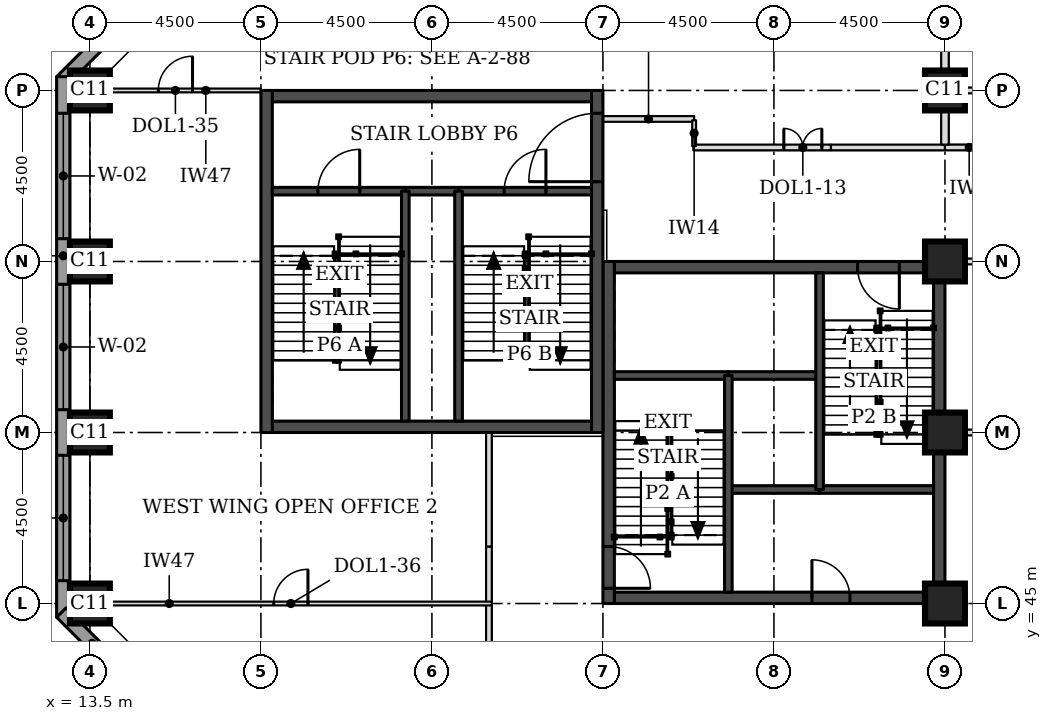
"""IFC4 building model, lengths in metres.
Left out: names, types, materials, properties, quantities, classifications, styles, units other than length and angle.
Written with IfcOpenShell. Run it as: python <this file> out.ifc"""

import sys

from ifc_helpers import new_model, si_unit, direction, frame, frame_2d, origin, origin_2d, place, context, subcontext, project, spatial, rectangle, extrude, element, fill, save


model = new_model("IFC4")
c1 = context("Model", 3, precision=1e-05, world=origin(), true_north=direction((0.0, 1.0)))
c2 = subcontext(c1, "Body", "Model", "MODEL_VIEW")
j1 = project(units=[si_unit("LENGTHUNIT", "METRE"), si_unit("PLANEANGLEUNIT", "RADIAN")], contexts=[c1])
p1 = place(None, origin())
s1 = spatial("IfcSite", under=j1, at=p1, CompositionType="ELEMENT")
p2 = place(p1, origin())
s2 = spatial("IfcBuilding", under=s1, at=p2, CompositionType="ELEMENT")
p3 = place(p2, frame((0.0, 0.0, 78.9)))
s3 = spatial("IfcBuildingStorey", under=s2, at=p3, CompositionType="ELEMENT", Elevation=78.9)
for number, where, z_axis, x_axis in (
    (1, (13.5, 45.0, 0.0), (0.0, 0.0, 1.0), (1.0, 0.0, 0.0)),
    (2, (36.0, 45.0, 0.0), (0.0, 0.0, 1.0), (1.0, 0.0, 0.0)),
    (3, (13.5, 49.5, 0.0), (0.0, 0.0, 1.0), (1.0, 0.0, 0.0)),
    (4, (36.0, 49.5, 0.0), (0.0, 0.0, 1.0), (1.0, 0.0, 0.0)),
    (5, (13.5, 54.0, 0.0), (0.0, 0.0, 1.0), (1.0, 0.0, 0.0)),
    (6, (36.0, 54.0, 0.0), (0.0, 0.0, 1.0), (1.0, 0.0, 0.0)),
    (7, (13.5, 58.5, 0.0), (0.0, 0.0, 1.0), (1.0, 0.0, 0.0)),
    (8, (36.0, 58.5, 0.0), (0.0, 0.0, 1.0), (1.0, 0.0, 0.0)),
):
    element("IfcColumn", number, at=place(p3, frame(where, z_axis=z_axis, x_axis=x_axis)), inside=s3, PredefinedType="COLUMN", context=c2, shape_type="SweptSolid", body=[
        extrude(rectangle(XDim=1.05, YDim=1.05, at=origin_2d()), origin(), (0.0, 0.0, 1.0), 3.7),
    ])
p4 = place(p3, frame((27.3, 45.15, 0.0), z_axis=(0.0, 0.0, 1.0), x_axis=(1.0, 0.0, 0.0)))
e9 = element("IfcWall", 9, at=p4, inside=s3, PredefinedType="SHEAR", context=c2, shape_type="SweptSolid", body=[
    extrude(rectangle(XDim=8.4, YDim=0.3, at=frame_2d((4.2, 0.0))), origin(), (0.0, 0.0, 1.0), 3.7),
])
p5 = place(p4, frame((5.2, 0.0, 0.0)))
e10 = element("IfcOpeningElement", 10, at=p5, cuts=e9, PredefinedType="OPENING", context=c2, shape_type="SweptSolid", body=[
    extrude(rectangle(XDim=1.0, YDim=2.1, at=frame_2d((0.5, 1.05))), frame((0.0, 0.16, 0.0), z_axis=(0.0, -1.0, 0.0), x_axis=(1.0, 0.0, 0.0)), (0.0, 0.0, 1.0), 0.32),
])
p6 = place(p3, frame((27.3, 53.85, 0.0), z_axis=(0.0, 0.0, 1.0), x_axis=(1.0, 0.0, 0.0)))
e11 = element("IfcWall", 11, at=p6, inside=s3, PredefinedType="SHEAR", context=c2, shape_type="SweptSolid", body=[
    extrude(rectangle(XDim=8.4, YDim=0.3, at=frame_2d((4.2, 0.0))), origin(), (0.0, 0.0, 1.0), 3.7),
])
p7 = place(p6, frame((6.4, 0.0, 0.0)))
e12 = element("IfcOpeningElement", 12, at=p7, cuts=e11, PredefinedType="OPENING", context=c2, shape_type="SweptSolid", body=[
    extrude(rectangle(XDim=1.1, YDim=2.1, at=frame_2d((0.55, 1.05))), frame((0.0, 0.16, 0.0), z_axis=(0.0, -1.0, 0.0), x_axis=(1.0, 0.0, 0.0)), (0.0, 0.0, 1.0), 0.32),
])
p8 = place(p3, frame((27.15, 45.0, 0.0), z_axis=(0.0, 0.0, 1.0), x_axis=(0.0, 1.0, 0.0)))
e13 = element("IfcWall", 13, at=p8, inside=s3, PredefinedType="SHEAR", context=c2, shape_type="SweptSolid", body=[
    extrude(rectangle(XDim=9.0, YDim=0.3, at=frame_2d((4.5, 0.0))), origin(), (0.0, 0.0, 1.0), 3.7),
])
p9 = place(p8, frame((0.4, 0.0, 0.0)))
e14 = element("IfcOpeningElement", 14, at=p9, cuts=e13, PredefinedType="OPENING", context=c2, shape_type="SweptSolid", body=[
    extrude(rectangle(XDim=1.1, YDim=2.1, at=frame_2d((0.55, 1.05))), frame((0.0, 0.16, 0.0), z_axis=(0.0, -1.0, 0.0), x_axis=(1.0, 0.0, 0.0)), (0.0, 0.0, 1.0), 0.32),
])
p10 = place(p3, frame((35.85, 45.0, 0.0), z_axis=(0.0, 0.0, 1.0), x_axis=(0.0, 1.0, 0.0)))
e15 = element("IfcWall", 15, at=p10, inside=s3, PredefinedType="SHEAR", context=c2, shape_type="SweptSolid", body=[
    extrude(rectangle(XDim=9.0, YDim=0.3, at=frame_2d((4.5, 0.0))), origin(), (0.0, 0.0, 1.0), 3.7),
])
for number, where, z_axis, x_axis in (
    (16, (18.3, 49.65, 0.0), (0.0, 0.0, 1.0), (1.0, 0.0, 0.0)),
    (17, (18.3, 58.35, 0.0), (0.0, 0.0, 1.0), (1.0, 0.0, 0.0)),
):
    element("IfcWall", number, at=place(p3, frame(where, z_axis=z_axis, x_axis=x_axis)), inside=s3, PredefinedType="SHEAR", context=c2, shape_type="SweptSolid", body=[
        extrude(rectangle(XDim=8.4, YDim=0.3, at=frame_2d((4.2, 0.0))), origin(), (0.0, 0.0, 1.0), 3.7),
    ])
p11 = place(p3, frame((18.15, 49.5, 0.0), z_axis=(0.0, 0.0, 1.0), x_axis=(0.0, 1.0, 0.0)))
e18 = element("IfcWall", 18, at=p11, inside=s3, PredefinedType="SHEAR", context=c2, shape_type="SweptSolid", body=[
    extrude(rectangle(XDim=9.0, YDim=0.3, at=frame_2d((4.5, 0.0))), origin(), (0.0, 0.0, 1.0), 3.7),
])
p12 = place(p3, frame((26.85, 49.5, 0.0), z_axis=(0.0, 0.0, 1.0), x_axis=(0.0, 1.0, 0.0)))
e19 = element("IfcWall", 19, at=p12, inside=s3, PredefinedType="SHEAR", context=c2, shape_type="SweptSolid", body=[
    extrude(rectangle(XDim=9.0, YDim=0.3, at=frame_2d((4.5, 0.0))), origin(), (0.0, 0.0, 1.0), 3.7),
])
p13 = place(p12, frame((6.6, 0.0, 0.0)))
e20 = element("IfcOpeningElement", 20, at=p13, cuts=e19, PredefinedType="OPENING", context=c2, shape_type="SweptSolid", body=[
    extrude(rectangle(XDim=1.8, YDim=2.1, at=frame_2d((0.9, 1.05))), frame((0.0, 0.16, 0.0), z_axis=(0.0, -1.0, 0.0), x_axis=(1.0, 0.0, 0.0)), (0.0, 0.0, 1.0), 0.32),
])
p14 = place(p3, frame((17.761, 63.751, 0.0), z_axis=(0.0, 0.0, 1.0), x_axis=(-0.707106781187, -0.707106781187, 0.0)))
e21 = element("IfcWall", 21, at=p14, inside=s3, PredefinedType="STANDARD", context=c2, shape_type="SweptSolid", body=[
    extrude(rectangle(XDim=7.089, YDim=0.35, at=frame_2d((3.544, 0.0))), origin(), (0.0, 0.0, 1.0), 3.525),
])
p15 = place(p14, frame((1.894, 0.0, 0.9)))
e22 = element("IfcOpeningElement", 22, at=p15, cuts=e21, PredefinedType="OPENING", context=c2, shape_type="SweptSolid", body=[
    extrude(rectangle(XDim=3.3, YDim=1.9, at=frame_2d((1.65, 0.95))), frame((0.0, 0.185, 0.0), z_axis=(0.0, -1.0, 0.0), x_axis=(1.0, 0.0, 0.0)), (0.0, 0.0, 1.0), 0.37),
])
p16 = place(p3, frame((12.8, 58.862, 0.0), z_axis=(0.0, 0.0, 1.0), x_axis=(0.0, -1.0, 0.0)))
e23 = element("IfcWall", 23, at=p16, inside=s3, PredefinedType="STANDARD", context=c2, shape_type="SweptSolid", body=[
    extrude(rectangle(XDim=14.225, YDim=0.35, at=frame_2d((7.112, 0.0))), origin(), (0.0, 0.0, 1.0), 3.525),
])
p17 = place(p16, frame((0.962, 0.0, 0.9)))
e24 = element("IfcOpeningElement", 24, at=p17, cuts=e23, PredefinedType="OPENING", context=c2, shape_type="SweptSolid", body=[
    extrude(rectangle(XDim=3.3, YDim=1.9, at=frame_2d((1.65, 0.95))), frame((0.0, 0.185, 0.0), z_axis=(0.0, -1.0, 0.0), x_axis=(1.0, 0.0, 0.0)), (0.0, 0.0, 1.0), 0.37),
])
p18 = place(p16, frame((5.462, 0.0, 0.9)))
e25 = element("IfcOpeningElement", 25, at=p18, cuts=e23, PredefinedType="OPENING", context=c2, shape_type="SweptSolid", body=[
    extrude(rectangle(XDim=3.3, YDim=1.9, at=frame_2d((1.65, 0.95))), frame((0.0, 0.185, 0.0), z_axis=(0.0, -1.0, 0.0), x_axis=(1.0, 0.0, 0.0)), (0.0, 0.0, 1.0), 0.37),
])
p19 = place(p16, frame((9.962, 0.0, 0.9)))
e26 = element("IfcOpeningElement", 26, at=p19, cuts=e23, PredefinedType="OPENING", context=c2, shape_type="SweptSolid", body=[
    extrude(rectangle(XDim=3.3, YDim=1.9, at=frame_2d((1.65, 0.95))), frame((0.0, 0.185, 0.0), z_axis=(0.0, -1.0, 0.0), x_axis=(1.0, 0.0, 0.0)), (0.0, 0.0, 1.0), 0.37),
])
p20 = place(p3, frame((12.749, 44.761, 0.0), z_axis=(0.0, 0.0, 1.0), x_axis=(0.707106781187, -0.707106781187, 0.0)))
e27 = element("IfcWall", 27, at=p20, inside=s3, PredefinedType="STANDARD", context=c2, shape_type="SweptSolid", body=[
    extrude(rectangle(XDim=7.089, YDim=0.35, at=frame_2d((3.544, 0.0))), origin(), (0.0, 0.0, 1.0), 3.525),
])
p21 = place(p20, frame((1.894, 0.0, 0.9)))
e28 = element("IfcOpeningElement", 28, at=p21, cuts=e27, PredefinedType="OPENING", context=c2, shape_type="SweptSolid", body=[
    extrude(rectangle(XDim=3.3, YDim=1.9, at=frame_2d((1.65, 0.95))), frame((0.0, 0.185, 0.0), z_axis=(0.0, -1.0, 0.0), x_axis=(1.0, 0.0, 0.0)), (0.0, 0.0, 1.0), 0.37),
])
for number, where, z_axis, x_axis in (
    (29, (36.525, 49.5, 0.0), (0.0, 0.0, 1.0), (1.0, 0.0, 0.0)),
    (30, (36.525, 54.0, 0.0), (0.0, 0.0, 1.0), (1.0, 0.0, 0.0)),
):
    element("IfcWall", number, at=place(p3, frame(where, z_axis=z_axis, x_axis=x_axis)), inside=s3, PredefinedType="PARTITIONING", context=c2, shape_type="SweptSolid", body=[
        extrude(rectangle(XDim=5.55, YDim=0.15, at=frame_2d((2.775, 0.0))), origin(), (0.0, 0.0, 1.0), 3.55),
    ])
p22 = place(p3, frame((29.38, 57.0, 0.0), z_axis=(0.0, 0.0, 1.0), x_axis=(1.0, 0.0, 0.0)))
e31 = element("IfcWall", 31, at=p22, inside=s3, PredefinedType="PARTITIONING", context=c2, shape_type="SweptSolid", body=[
    extrude(rectangle(XDim=3.62, YDim=0.15, at=frame_2d((1.81, 0.0))), origin(), (0.0, 0.0, 1.0), 3.55),
])
p23 = place(p22, frame((2.38, 0.0, 0.0)))
e32 = element("IfcOpeningElement", 32, at=p23, cuts=e31, PredefinedType="OPENING", context=c2, shape_type="SweptSolid", body=[
    extrude(rectangle(XDim=1.0, YDim=2.1, at=frame_2d((0.5, 1.05))), frame((0.0, 0.085, 0.0), z_axis=(0.0, -1.0, 0.0), x_axis=(1.0, 0.0, 0.0)), (0.0, 0.0, 1.0), 0.17),
])
p24 = place(p3, frame((33.0, 57.0, 0.0), z_axis=(0.0, 0.0, 1.0), x_axis=(1.0, 0.0, 0.0)))
e33 = element("IfcWall", 33, at=p24, inside=s3, PredefinedType="PARTITIONING", context=c2, shape_type="SweptSolid", body=[
    extrude(rectangle(XDim=3.0, YDim=0.15, at=frame_2d((1.5, 0.0))), origin(), (0.0, 0.0, 1.0), 3.55),
])
p25 = place(p3, frame((36.0, 57.0, 0.0), z_axis=(0.0, 0.0, 1.0), x_axis=(1.0, 0.0, 0.0)))
e34 = element("IfcWall", 34, at=p25, inside=s3, PredefinedType="PARTITIONING", context=c2, shape_type="SweptSolid", body=[
    extrude(rectangle(XDim=6.075, YDim=0.15, at=frame_2d((3.038, 0.0))), origin(), (0.0, 0.0, 1.0), 3.55),
])
p26 = place(p3, frame((36.525, 58.5, 0.0), z_axis=(0.0, 0.0, 1.0), x_axis=(1.0, 0.0, 0.0)))
e35 = element("IfcWall", 35, at=p26, inside=s3, PredefinedType="PARTITIONING", context=c2, shape_type="SweptSolid", body=[
    extrude(rectangle(XDim=2.55, YDim=0.15, at=frame_2d((1.275, 0.0))), origin(), (0.0, 0.0, 1.0), 3.55),
])
p27 = place(p3, frame((24.0, 39.975, 0.0), z_axis=(0.0, 0.0, 1.0), x_axis=(0.0, 1.0, 0.0)))
e36 = element("IfcWall", 36, at=p27, inside=s3, PredefinedType="PARTITIONING", context=c2, shape_type="SweptSolid", body=[
    extrude(rectangle(XDim=5.025, YDim=0.15, at=frame_2d((2.512, 0.0))), origin(), (0.0, 0.0, 1.0), 3.55),
])
p28 = place(p3, frame((24.0, 45.0, 0.0), z_axis=(0.0, 0.0, 1.0), x_axis=(0.0, 1.0, 0.0)))
e37 = element("IfcWall", 37, at=p28, inside=s3, PredefinedType="PARTITIONING", context=c2, shape_type="SweptSolid", body=[
    extrude(rectangle(XDim=1.5, YDim=0.15, at=frame_2d((0.75, 0.0))), origin(), (0.0, 0.0, 1.0), 3.55),
])
p29 = place(p3, frame((24.0, 46.5, 0.0), z_axis=(0.0, 0.0, 1.0), x_axis=(0.0, 1.0, 0.0)))
e38 = element("IfcWall", 38, at=p29, inside=s3, PredefinedType="PARTITIONING", context=c2, shape_type="SweptSolid", body=[
    extrude(rectangle(XDim=3.0, YDim=0.15, at=frame_2d((1.5, 0.0))), origin(), (0.0, 0.0, 1.0), 3.55),
])
p30 = place(p3, frame((36.0, 57.075, 0.0), z_axis=(0.0, 0.0, 1.0), x_axis=(0.0, 1.0, 0.0)))
e39 = element("IfcWall", 39, at=p30, inside=s3, PredefinedType="PARTITIONING", context=c2, shape_type="SweptSolid", body=[
    extrude(rectangle(XDim=0.9, YDim=0.2, at=frame_2d((0.45, 0.0))), origin(), (0.0, 0.0, 1.0), 2.8),
])
p31 = place(p3, frame((36.0, 58.995, 0.0), z_axis=(0.0, 0.0, 1.0), x_axis=(0.0, 1.0, 0.0)))
e40 = element("IfcWall", 40, at=p31, inside=s3, PredefinedType="PARTITIONING", context=c2, shape_type="SweptSolid", body=[
    extrude(rectangle(XDim=1.005, YDim=0.2, at=frame_2d((0.502, 0.0))), origin(), (0.0, 0.0, 1.0), 2.8),
])
p32 = place(p3, frame((13.5, 58.5, 0.0), z_axis=(0.0, 0.0, 1.0), x_axis=(1.0, 0.0, 0.0)))
e41 = element("IfcWall", 41, at=p32, inside=s3, PredefinedType="PARTITIONING", context=c2, shape_type="SweptSolid", body=[
    extrude(rectangle(XDim=4.5, YDim=0.1, at=frame_2d((2.25, 0.0))), origin(), (0.0, 0.0, 1.0), 2.55),
])
p33 = place(p32, frame((1.8, 0.0, 0.0)))
e42 = element("IfcOpeningElement", 42, at=p33, cuts=e41, PredefinedType="OPENING", context=c2, shape_type="SweptSolid", body=[
    extrude(rectangle(XDim=0.9, YDim=2.1, at=frame_2d((0.45, 1.05))), frame((0.0, 0.06, 0.0), z_axis=(0.0, -1.0, 0.0), x_axis=(1.0, 0.0, 0.0)), (0.0, 0.0, 1.0), 0.12),
])
p34 = place(p3, frame((24.075, 45.0, 0.0), z_axis=(0.0, 0.0, 1.0), x_axis=(-1.0, 0.0, 0.0)))
e43 = element("IfcWall", 43, at=p34, inside=s3, PredefinedType="PARTITIONING", context=c2, shape_type="SweptSolid", body=[
    extrude(rectangle(XDim=10.575, YDim=0.1, at=frame_2d((5.288, 0.0))), origin(), (0.0, 0.0, 1.0), 2.55),
])
p35 = place(p34, frame((4.837, 0.0, 0.0)))
e44 = element("IfcOpeningElement", 44, at=p35, cuts=e43, PredefinedType="OPENING", context=c2, shape_type="SweptSolid", body=[
    extrude(rectangle(XDim=0.9, YDim=2.1, at=frame_2d((0.45, 1.05))), frame((0.0, 0.06, 0.0), z_axis=(0.0, -1.0, 0.0), x_axis=(1.0, 0.0, 0.0)), (0.0, 0.0, 1.0), 0.12),
])
p36 = place(p3, frame((27.0, 57.75, 0.0), z_axis=(0.0, 0.0, 1.0), x_axis=(1.0, 0.0, 0.0)))
e45 = element("IfcWall", 45, at=p36, inside=s3, PredefinedType="PARTITIONING", context=c2, shape_type="SweptSolid", body=[
    extrude(rectangle(XDim=2.4, YDim=0.15, at=frame_2d((1.2, 0.0))), origin(), (0.0, 0.0, 1.0), 3.55),
])
p37 = place(p3, frame((29.4, 57.715, 0.0), z_axis=(0.0, 0.0, 1.0), x_axis=(0.0, -1.0, 0.0)))
e46 = element("IfcWall", 46, at=p37, inside=s3, PredefinedType="PARTITIONING", context=c2, shape_type="SweptSolid", body=[
    extrude(rectangle(XDim=0.68, YDim=0.1, at=frame_2d((0.34, 0.0))), origin(), (0.0, 0.0, 1.0), 3.55),
])
p38 = place(p3, frame((30.3, 48.0, 0.0), z_axis=(0.0, 0.0, 1.0), x_axis=(1.0, 0.0, 0.0)))
e47 = element("IfcWall", 47, at=p38, inside=s3, PredefinedType="SOLIDWALL", context=c2, shape_type="SweptSolid", body=[
    extrude(rectangle(XDim=2.4, YDim=0.2, at=frame_2d((1.2, 0.0))), origin(), (0.0, 0.0, 1.0), 3.55),
])
p39 = place(p3, frame((32.7, 48.0, 0.0), z_axis=(0.0, 0.0, 1.0), x_axis=(1.0, 0.0, 0.0)))
e48 = element("IfcWall", 48, at=p39, inside=s3, PredefinedType="SOLIDWALL", context=c2, shape_type="SweptSolid", body=[
    extrude(rectangle(XDim=3.0, YDim=0.2, at=frame_2d((1.5, 0.0))), origin(), (0.0, 0.0, 1.0), 3.55),
])
p40 = place(p3, frame((30.3, 51.0, 0.0), z_axis=(0.0, 0.0, 1.0), x_axis=(1.0, 0.0, 0.0)))
e49 = element("IfcWall", 49, at=p40, inside=s3, PredefinedType="SOLIDWALL", context=c2, shape_type="SweptSolid", body=[
    extrude(rectangle(XDim=2.4, YDim=0.2, at=frame_2d((1.2, 0.0))), origin(), (0.0, 0.0, 1.0), 3.7),
])
p41 = place(p3, frame((27.3, 51.0, 0.0), z_axis=(0.0, 0.0, 1.0), x_axis=(1.0, 0.0, 0.0)))
e50 = element("IfcWall", 50, at=p41, inside=s3, PredefinedType="SOLIDWALL", context=c2, shape_type="SweptSolid", body=[
    extrude(rectangle(XDim=3.0, YDim=0.2, at=frame_2d((1.5, 0.0))), origin(), (0.0, 0.0, 1.0), 3.55),
])
for number, where, z_axis, x_axis in (
    (51, (30.3, 45.3, 0.0), (0.0, 0.0, 1.0), (0.0, 1.0, 0.0)),
    (52, (32.7, 48.0, 0.0), (0.0, 0.0, 1.0), (0.0, 1.0, 0.0)),
):
    element("IfcWall", number, at=place(p3, frame(where, z_axis=z_axis, x_axis=x_axis)), inside=s3, PredefinedType="SOLIDWALL", context=c2, shape_type="SweptSolid", body=[
        extrude(rectangle(XDim=5.7, YDim=0.2, at=frame_2d((2.85, 0.0))), origin(), (0.0, 0.0, 1.0), 3.55),
    ])
p42 = place(p3, frame((21.8, 55.85, 0.0), z_axis=(0.0, 0.0, 1.0), x_axis=(1.0, 0.0, 0.0)))
e53 = element("IfcWall", 53, at=p42, inside=s3, PredefinedType="SOLIDWALL", context=c2, shape_type="SweptSolid", body=[
    extrude(rectangle(XDim=1.4, YDim=0.2, at=frame_2d((0.7, 0.0))), origin(), (0.0, 0.0, 1.0), 3.55),
])
p43 = place(p3, frame((18.3, 55.85, 0.0), z_axis=(0.0, 0.0, 1.0), x_axis=(1.0, 0.0, 0.0)))
e54 = element("IfcWall", 54, at=p43, inside=s3, PredefinedType="SOLIDWALL", context=c2, shape_type="SweptSolid", body=[
    extrude(rectangle(XDim=3.5, YDim=0.2, at=frame_2d((1.75, 0.0))), origin(), (0.0, 0.0, 1.0), 3.55),
])
p44 = place(p43, frame((1.2, 0.0, 0.0)))
e55 = element("IfcOpeningElement", 55, at=p44, cuts=e54, PredefinedType="OPENING", context=c2, shape_type="SweptSolid", body=[
    extrude(rectangle(XDim=1.1, YDim=2.1, at=frame_2d((0.55, 1.05))), frame((0.0, 0.11, 0.0), z_axis=(0.0, -1.0, 0.0), x_axis=(1.0, 0.0, 0.0)), (0.0, 0.0, 1.0), 0.22),
])
p45 = place(p3, frame((23.2, 55.85, 0.0), z_axis=(0.0, 0.0, 1.0), x_axis=(1.0, 0.0, 0.0)))
e56 = element("IfcWall", 56, at=p45, inside=s3, PredefinedType="SOLIDWALL", context=c2, shape_type="SweptSolid", body=[
    extrude(rectangle(XDim=3.5, YDim=0.2, at=frame_2d((1.75, 0.0))), origin(), (0.0, 0.0, 1.0), 3.55),
])
p46 = place(p45, frame((1.2, 0.0, 0.0)))
e57 = element("IfcOpeningElement", 57, at=p46, cuts=e56, PredefinedType="OPENING", context=c2, shape_type="SweptSolid", body=[
    extrude(rectangle(XDim=1.1, YDim=2.1, at=frame_2d((0.55, 1.05))), frame((0.0, 0.11, 0.0), z_axis=(0.0, -1.0, 0.0), x_axis=(1.0, 0.0, 0.0)), (0.0, 0.0, 1.0), 0.22),
])
for number, where, z_axis, x_axis in (
    (58, (21.8, 49.8, 0.0), (0.0, 0.0, 1.0), (0.0, 1.0, 0.0)),
    (59, (23.2, 49.8, 0.0), (0.0, 0.0, 1.0), (0.0, 1.0, 0.0)),
):
    element("IfcWall", number, at=place(p3, frame(where, z_axis=z_axis, x_axis=x_axis)), inside=s3, PredefinedType="SOLIDWALL", context=c2, shape_type="SweptSolid", body=[
        extrude(rectangle(XDim=6.05, YDim=0.2, at=frame_2d((3.025, 0.0))), origin(), (0.0, 0.0, 1.0), 3.55),
    ])
p47 = place(p17, origin())
e60 = element("IfcWindow", 60, at=p47, inside=s3, PartitioningType="SINGLE_PANEL", PredefinedType="WINDOW", context=c2, shape_type="SweptSolid", body=[
    extrude(rectangle(XDim=3.3, YDim=1.9, at=frame_2d((1.65, 0.95))), frame((0.0, 0.085, 0.0), z_axis=(0.0, -1.0, 0.0), x_axis=(1.0, 0.0, 0.0)), (0.0, 0.0, 1.0), 0.06),
])
fill(e24, e60)
p48 = place(p18, origin())
e61 = element("IfcWindow", 61, at=p48, inside=s3, PartitioningType="SINGLE_PANEL", PredefinedType="WINDOW", context=c2, shape_type="SweptSolid", body=[
    extrude(rectangle(XDim=3.3, YDim=1.9, at=frame_2d((1.65, 0.95))), frame((0.0, 0.085, 0.0), z_axis=(0.0, -1.0, 0.0), x_axis=(1.0, 0.0, 0.0)), (0.0, 0.0, 1.0), 0.06),
])
fill(e25, e61)
p49 = place(p19, origin())
e62 = element("IfcWindow", 62, at=p49, inside=s3, PartitioningType="SINGLE_PANEL", PredefinedType="WINDOW", context=c2, shape_type="SweptSolid", body=[
    extrude(rectangle(XDim=3.3, YDim=1.9, at=frame_2d((1.65, 0.95))), frame((0.0, 0.085, 0.0), z_axis=(0.0, -1.0, 0.0), x_axis=(1.0, 0.0, 0.0)), (0.0, 0.0, 1.0), 0.06),
])
fill(e26, e62)
p50 = place(p23, origin())
e63 = element("IfcDoor", 63, at=p50, inside=s3, OperationType="DOUBLE_DOOR_SINGLE_SWING", PredefinedType="DOOR", context=c2, shape_type="SweptSolid", body=[
    extrude(rectangle(XDim=1.0, YDim=2.1, at=frame_2d((0.5, 1.05))), frame((0.0, 0.025, 0.0), z_axis=(0.0, -1.0, 0.0), x_axis=(1.0, 0.0, 0.0)), (0.0, 0.0, 1.0), 0.05),
])
fill(e32, e63)
p51 = place(p33, origin())
e64 = element("IfcDoor", 64, at=p51, inside=s3, OperationType="SINGLE_SWING_RIGHT", PredefinedType="DOOR", context=c2, shape_type="SweptSolid", body=[
    extrude(rectangle(XDim=0.9, YDim=2.1, at=frame_2d((0.45, 1.05))), frame((0.0, 0.025, 0.0), z_axis=(0.0, -1.0, 0.0), x_axis=(1.0, 0.0, 0.0)), (0.0, 0.0, 1.0), 0.05),
])
fill(e42, e64)
p52 = place(p35, frame((0.9, 0.0, 0.0), z_axis=(0.0, 0.0, 1.0), x_axis=(-1.0, 0.0, 0.0)))
e65 = element("IfcDoor", 65, at=p52, inside=s3, OperationType="SINGLE_SWING_RIGHT", PredefinedType="DOOR", context=c2, shape_type="SweptSolid", body=[
    extrude(rectangle(XDim=0.9, YDim=2.1, at=frame_2d((0.45, 1.05))), frame((0.0, 0.025, 0.0), z_axis=(0.0, -1.0, 0.0), x_axis=(1.0, 0.0, 0.0)), (0.0, 0.0, 1.0), 0.05),
])
fill(e44, e65)
p53 = place(p9, frame((1.1, 0.0, 0.0), z_axis=(0.0, 0.0, 1.0), x_axis=(-1.0, 0.0, 0.0)))
e66 = element("IfcDoor", 66, at=p53, inside=s3, OperationType="SINGLE_SWING_RIGHT", PredefinedType="DOOR", context=c2, shape_type="SweptSolid", body=[
    extrude(rectangle(XDim=1.1, YDim=2.1, at=frame_2d((0.55, 1.05))), frame((0.0, 0.025, 0.0), z_axis=(0.0, -1.0, 0.0), x_axis=(1.0, 0.0, 0.0)), (0.0, 0.0, 1.0), 0.05),
])
fill(e14, e66)
p54 = place(p7, frame((1.1, 0.0, 0.0), z_axis=(0.0, 0.0, 1.0), x_axis=(-1.0, 0.0, 0.0)))
e67 = element("IfcDoor", 67, at=p54, inside=s3, OperationType="SINGLE_SWING_LEFT", PredefinedType="DOOR", context=c2, shape_type="SweptSolid", body=[
    extrude(rectangle(XDim=1.1, YDim=2.1, at=frame_2d((0.55, 1.05))), frame((0.0, 0.025, 0.0), z_axis=(0.0, -1.0, 0.0), x_axis=(1.0, 0.0, 0.0)), (0.0, 0.0, 1.0), 0.05),
])
fill(e12, e67)
p55 = place(p5, origin())
e68 = element("IfcDoor", 68, at=p55, inside=s3, OperationType="SINGLE_SWING_LEFT", PredefinedType="DOOR", context=c2, shape_type="SweptSolid", body=[
    extrude(rectangle(XDim=1.0, YDim=2.1, at=frame_2d((0.5, 1.05))), frame((0.0, 0.025, 0.0), z_axis=(0.0, -1.0, 0.0), x_axis=(1.0, 0.0, 0.0)), (0.0, 0.0, 1.0), 0.05),
])
fill(e10, e68)
p56 = place(p44, origin())
e69 = element("IfcDoor", 69, at=p56, inside=s3, OperationType="SINGLE_SWING_RIGHT", PredefinedType="DOOR", context=c2, shape_type="SweptSolid", body=[
    extrude(rectangle(XDim=1.1, YDim=2.1, at=frame_2d((0.55, 1.05))), frame((0.0, 0.025, 0.0), z_axis=(0.0, -1.0, 0.0), x_axis=(1.0, 0.0, 0.0)), (0.0, 0.0, 1.0), 0.05),
])
fill(e55, e69)
p57 = place(p46, origin())
e70 = element("IfcDoor", 70, at=p57, inside=s3, OperationType="SINGLE_SWING_RIGHT", PredefinedType="DOOR", context=c2, shape_type="SweptSolid", body=[
    extrude(rectangle(XDim=1.1, YDim=2.1, at=frame_2d((0.55, 1.05))), frame((0.0, 0.025, 0.0), z_axis=(0.0, -1.0, 0.0), x_axis=(1.0, 0.0, 0.0)), (0.0, 0.0, 1.0), 0.05),
])
fill(e57, e70)
p58 = place(p13, origin())
e71 = element("IfcDoor", 71, at=p58, inside=s3, OperationType="SINGLE_SWING_LEFT", PredefinedType="DOOR", context=c2, shape_type="SweptSolid", body=[
    extrude(rectangle(XDim=1.8, YDim=2.1, at=frame_2d((0.9, 1.05))), frame((0.0, 0.025, 0.0), z_axis=(0.0, -1.0, 0.0), x_axis=(1.0, 0.0, 0.0)), (0.0, 0.0, 1.0), 0.05),
])
fill(e20, e71)
save(model, sys.argv[1])
